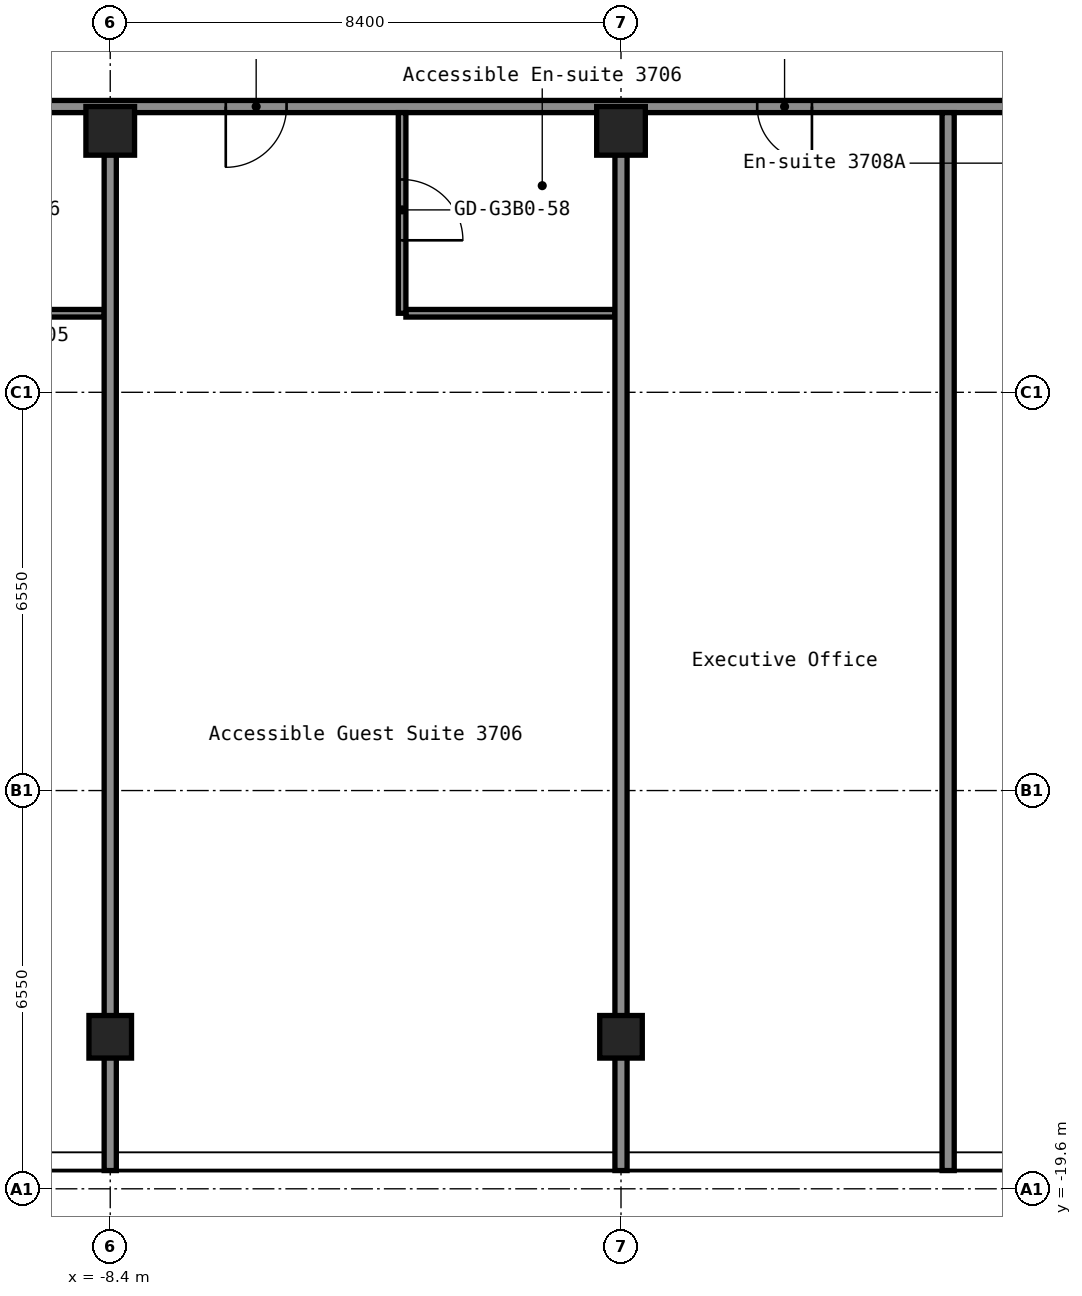
"""IFC4 building model, lengths in metres.
Left out: names, types, materials, properties, quantities, classifications, styles, units other than length and angle.
Written with IfcOpenShell. Run it as: python <this file> out.ifc"""

import sys

from ifc_helpers import new_model, si_unit, direction, frame, frame_2d, origin, origin_2d, place, context, subcontext, project, spatial, rectangle, hollow_rectangle, extrude, element, fill, save


model = new_model("IFC4")
c1 = context("Model", 3, precision=1e-05, world=origin(), true_north=direction((0.0, 1.0)))
c2 = subcontext(c1, "Body", "Model", "MODEL_VIEW")
j1 = project(units=[si_unit("LENGTHUNIT", "METRE"), si_unit("PLANEANGLEUNIT", "RADIAN")], contexts=[c1])
p1 = place(None, origin())
s1 = spatial("IfcSite", under=j1, at=p1, CompositionType="ELEMENT")
p2 = place(p1, origin())
s2 = spatial("IfcBuilding", under=s1, at=p2, CompositionType="ELEMENT")
p3 = place(p2, frame((0.0, 0.0, 134.2)))
s3 = spatial("IfcBuildingStorey", under=s2, at=p3, CompositionType="ELEMENT", Elevation=134.2)
p4 = place(p3, frame((-8.4, -17.1, 0.0), z_axis=(0.0, 0.0, 1.0), x_axis=(1.0, 0.0, 0.0)))
e1 = element("IfcColumn", 1, at=p4, inside=s3, PredefinedType="COLUMN", context=c2, shape_type="SweptSolid", body=[
    extrude(hollow_rectangle(XDim=0.7, YDim=0.7, WallThickness=0.028, at=origin_2d()), origin(), (0.0, 0.0, 1.0), 2.75),
])
p5 = place(p3, frame((-8.4, -2.2, 0.0), z_axis=(0.0, 0.0, 1.0), x_axis=(1.0, 0.0, 0.0)))
e2 = element("IfcColumn", 2, at=p5, inside=s3, PredefinedType="COLUMN", context=c2, shape_type="SweptSolid", body=[
    extrude(hollow_rectangle(XDim=0.8, YDim=0.8, WallThickness=0.032, at=origin_2d()), origin(), (0.0, 0.0, 1.0), 2.75),
])
p6 = place(p3, frame((0.0, -17.1, 0.0), z_axis=(0.0, 0.0, 1.0), x_axis=(1.0, 0.0, 0.0)))
e3 = element("IfcColumn", 3, at=p6, inside=s3, PredefinedType="COLUMN", context=c2, shape_type="SweptSolid", body=[
    extrude(hollow_rectangle(XDim=0.7, YDim=0.7, WallThickness=0.028, at=origin_2d()), origin(), (0.0, 0.0, 1.0), 2.75),
])
p7 = place(p3, frame((0.0, -2.2, 0.0), z_axis=(0.0, 0.0, 1.0), x_axis=(1.0, 0.0, 0.0)))
e4 = element("IfcColumn", 4, at=p7, inside=s3, PredefinedType="COLUMN", context=c2, shape_type="SweptSolid", body=[
    extrude(hollow_rectangle(XDim=0.8, YDim=0.8, WallThickness=0.032, at=origin_2d()), origin(), (0.0, 0.0, 1.0), 2.75),
])
for number, where, z_axis, x_axis in (
    (5, (-11.938, -5.2, 0.0), (0.0, 0.0, 1.0), (1.0, 0.0, 0.0)),
    (6, (-3.538, -5.2, 0.0), (0.0, 0.0, 1.0), (1.0, 0.0, 0.0)),
):
    element("IfcWall", number, at=place(p3, frame(where, z_axis=z_axis, x_axis=x_axis)), inside=s3, PredefinedType="PARTITIONING", context=c2, shape_type="SweptSolid", body=[
        extrude(rectangle(XDim=3.438, YDim=0.125, at=frame_2d((1.719, 0.0))), origin(), (0.0, 0.0, 1.0), 2.75),
    ])
p8 = place(p3, frame((-16.8, -1.8, 0.0), z_axis=(0.0, 0.0, 1.0), x_axis=(1.0, 0.0, 0.0)))
e7 = element("IfcWall", 7, at=p8, inside=s3, PredefinedType="PARTITIONING", context=c2, shape_type="SweptSolid", body=[
    extrude(rectangle(XDim=33.6, YDim=0.2, at=frame_2d((16.8, 0.0))), origin(), (0.0, 0.0, 1.0), 2.75),
])
p9 = place(p8, frame((1.9, 0.0, 0.0)))
e8 = element("IfcOpeningElement", 8, at=p9, cuts=e7, PredefinedType="OPENING", context=c2, shape_type="SweptSolid", body=[
    extrude(rectangle(XDim=1.0, YDim=2.1, at=frame_2d((0.5, 1.05))), frame((0.0, 0.11, 0.0), z_axis=(0.0, -1.0, 0.0), x_axis=(1.0, 0.0, 0.0)), (0.0, 0.0, 1.0), 0.22),
])
p10 = place(p8, frame((10.3, 0.0, 0.0)))
e9 = element("IfcOpeningElement", 9, at=p10, cuts=e7, PredefinedType="OPENING", context=c2, shape_type="SweptSolid", body=[
    extrude(rectangle(XDim=1.0, YDim=2.1, at=frame_2d((0.5, 1.05))), frame((0.0, 0.11, 0.0), z_axis=(0.0, -1.0, 0.0), x_axis=(1.0, 0.0, 0.0)), (0.0, 0.0, 1.0), 0.22),
])
p11 = place(p8, frame((19.04, 0.0, 0.0)))
e10 = element("IfcOpeningElement", 10, at=p11, cuts=e7, PredefinedType="OPENING", context=c2, shape_type="SweptSolid", body=[
    extrude(rectangle(XDim=0.9, YDim=2.1, at=frame_2d((0.45, 1.05))), frame((0.0, 0.11, 0.0), z_axis=(0.0, -1.0, 0.0), x_axis=(1.0, 0.0, 0.0)), (0.0, 0.0, 1.0), 0.22),
])
p12 = place(p8, frame((23.24, 0.0, 0.0)))
e11 = element("IfcOpeningElement", 11, at=p12, cuts=e7, PredefinedType="OPENING", context=c2, shape_type="SweptSolid", body=[
    extrude(rectangle(XDim=0.9, YDim=2.1, at=frame_2d((0.45, 1.05))), frame((0.0, 0.11, 0.0), z_axis=(0.0, -1.0, 0.0), x_axis=(1.0, 0.0, 0.0)), (0.0, 0.0, 1.0), 0.22),
])
p13 = place(p8, frame((28.05, 0.0, 0.0)))
e12 = element("IfcOpeningElement", 12, at=p13, cuts=e7, PredefinedType="OPENING", context=c2, shape_type="SweptSolid", body=[
    extrude(rectangle(XDim=1.0, YDim=2.1, at=frame_2d((0.5, 1.05))), frame((0.0, 0.11, 0.0), z_axis=(0.0, -1.0, 0.0), x_axis=(1.0, 0.0, 0.0)), (0.0, 0.0, 1.0), 0.22),
])
p14 = place(p8, frame((29.75, 0.0, 0.0)))
e13 = element("IfcOpeningElement", 13, at=p14, cuts=e7, PredefinedType="OPENING", context=c2, shape_type="SweptSolid", body=[
    extrude(rectangle(XDim=1.0, YDim=2.1, at=frame_2d((0.5, 1.05))), frame((0.0, 0.11, 0.0), z_axis=(0.0, -1.0, 0.0), x_axis=(1.0, 0.0, 0.0)), (0.0, 0.0, 1.0), 0.22),
])
p15 = place(p3, frame((-8.4, -19.3, 0.0), z_axis=(0.0, 0.0, 1.0), x_axis=(0.0, 1.0, 0.0)))
e14 = element("IfcWall", 14, at=p15, inside=s3, PredefinedType="PARTITIONING", context=c2, shape_type="SweptSolid", body=[
    extrude(rectangle(XDim=16.71, YDim=0.2, at=frame_2d((8.355, 0.0))), origin(), (0.0, 0.0, 1.0), 2.75),
])
p16 = place(p3, frame((-3.6, -5.2, 0.0), z_axis=(0.0, 0.0, 1.0), x_axis=(0.0, 1.0, 0.0)))
e15 = element("IfcWall", 15, at=p16, inside=s3, PredefinedType="PARTITIONING", context=c2, shape_type="SweptSolid", body=[
    extrude(rectangle(XDim=3.3, YDim=0.125, at=frame_2d((1.65, 0.0))), origin(), (0.0, 0.0, 1.0), 2.75),
])
p17 = place(p16, frame((1.2, 0.0, 0.0)))
e16 = element("IfcOpeningElement", 16, at=p17, cuts=e15, PredefinedType="OPENING", context=c2, shape_type="SweptSolid", body=[
    extrude(rectangle(XDim=1.0, YDim=2.1, at=frame_2d((0.5, 1.05))), frame((0.0, 0.073, 0.0), z_axis=(0.0, -1.0, 0.0), x_axis=(1.0, 0.0, 0.0)), (0.0, 0.0, 1.0), 0.145),
])
p18 = place(p3, frame((0.0, -19.3, 0.0), z_axis=(0.0, 0.0, 1.0), x_axis=(0.0, 1.0, 0.0)))
e17 = element("IfcWall", 17, at=p18, inside=s3, PredefinedType="PARTITIONING", context=c2, shape_type="SweptSolid", body=[
    extrude(rectangle(XDim=16.71, YDim=0.2, at=frame_2d((8.355, 0.0))), origin(), (0.0, 0.0, 1.0), 2.75),
])
p19 = place(p3, frame((5.38, -19.3, 0.0), z_axis=(0.0, 0.0, 1.0), x_axis=(0.0, 1.0, 0.0)))
e18 = element("IfcWall", 18, at=p19, inside=s3, PredefinedType="PARTITIONING", context=c2, shape_type="SweptSolid", body=[
    extrude(rectangle(XDim=17.4, YDim=0.2, at=frame_2d((8.7, 0.0))), origin(), (0.0, 0.0, 1.0), 2.75),
])
p20 = place(p10, origin())
e19 = element("IfcDoor", 19, at=p20, inside=s3, OperationType="SINGLE_SWING_LEFT", PredefinedType="DOOR", context=c2, shape_type="SweptSolid", body=[
    extrude(rectangle(XDim=1.0, YDim=2.1, at=frame_2d((0.5, 1.05))), frame((0.0, 0.025, 0.0), z_axis=(0.0, -1.0, 0.0), x_axis=(1.0, 0.0, 0.0)), (0.0, 0.0, 1.0), 0.05),
])
fill(e9, e19)
p21 = place(p11, origin())
e20 = element("IfcDoor", 20, at=p21, inside=s3, OperationType="SINGLE_SWING_RIGHT", PredefinedType="DOOR", context=c2, shape_type="SweptSolid", body=[
    extrude(rectangle(XDim=0.9, YDim=2.1, at=frame_2d((0.45, 1.05))), frame((0.0, 0.025, 0.0), z_axis=(0.0, -1.0, 0.0), x_axis=(1.0, 0.0, 0.0)), (0.0, 0.0, 1.0), 0.05),
])
fill(e10, e20)
p22 = place(p17, origin())
e21 = element("IfcDoor", 21, at=p22, inside=s3, OperationType="SINGLE_SWING_LEFT", PredefinedType="DOOR", context=c2, shape_type="SweptSolid", body=[
    extrude(rectangle(XDim=1.0, YDim=2.1, at=frame_2d((0.5, 1.05))), frame((0.0, 0.025, 0.0), z_axis=(0.0, -1.0, 0.0), x_axis=(1.0, 0.0, 0.0)), (0.0, 0.0, 1.0), 0.05),
])
fill(e16, e21)
save(model, sys.argv[1])
